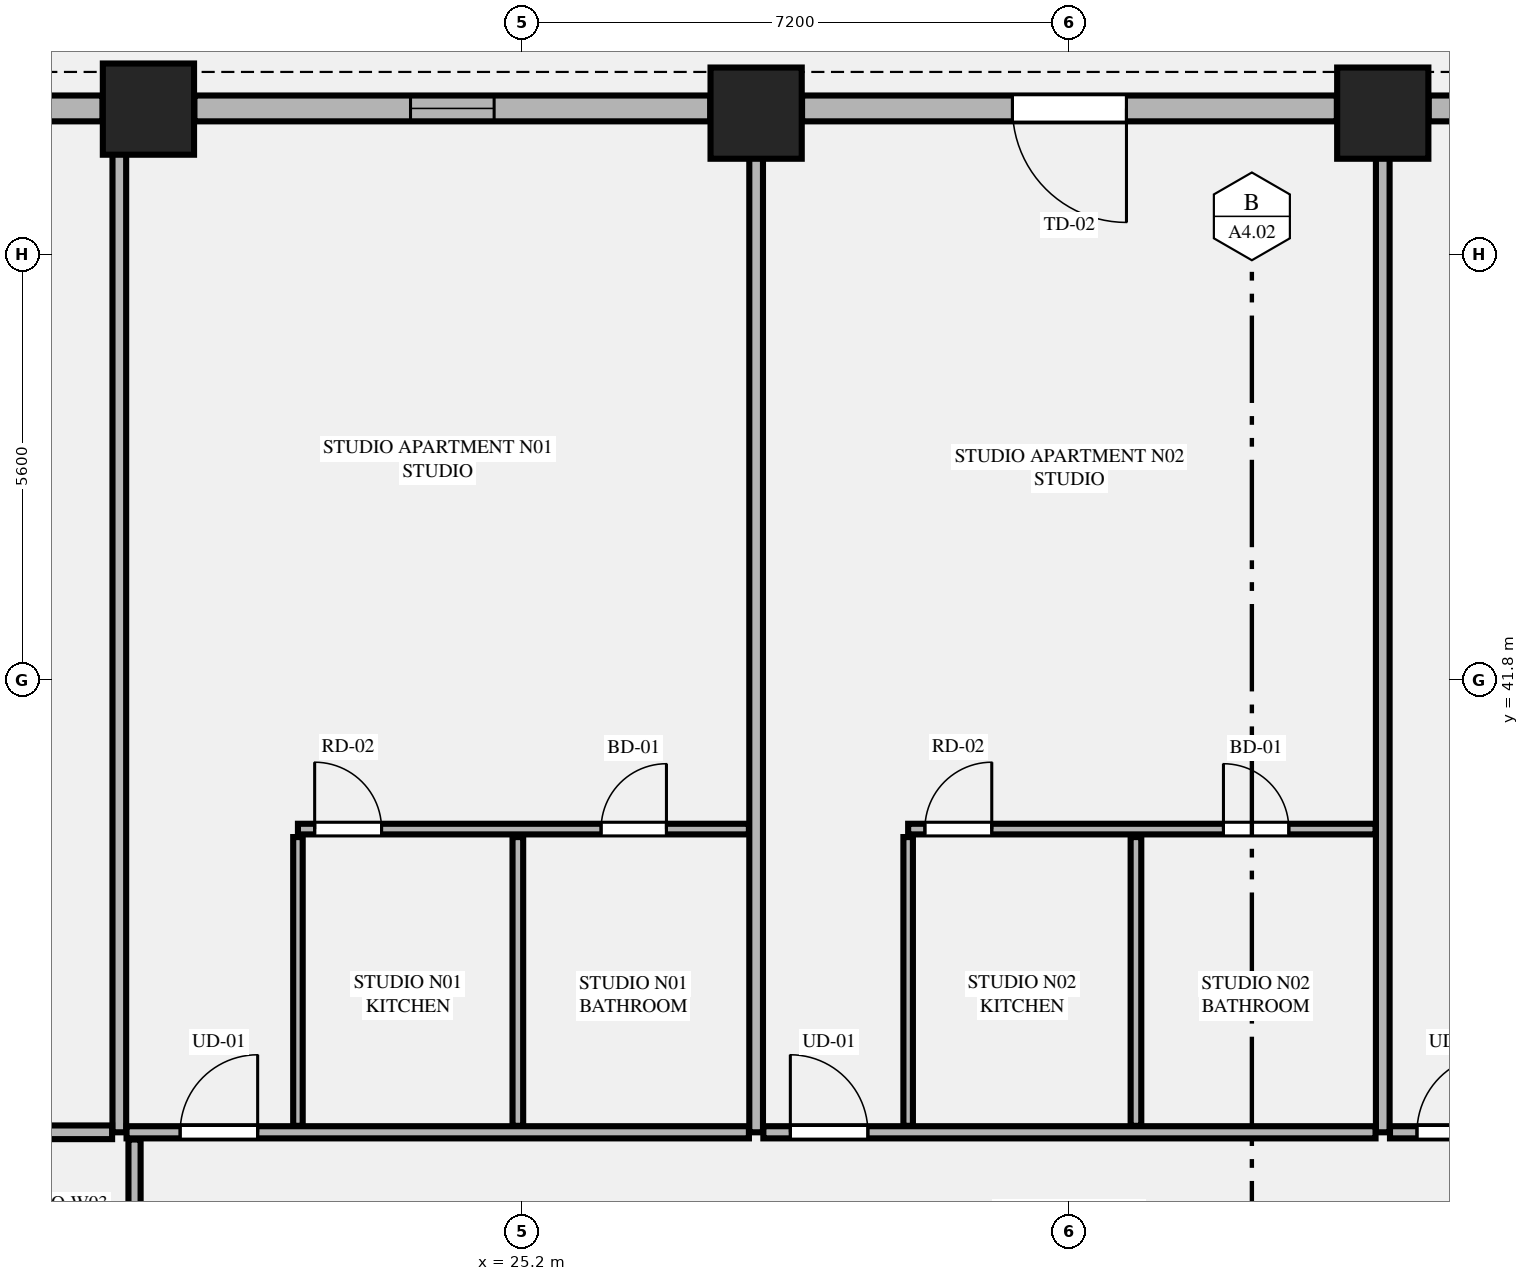
"""IFC4 building model, lengths in metres.
Left out: names, types, materials, properties, quantities, classifications, styles, units other than length and angle.
Written with IfcOpenShell. Run it as: python <this file> out.ifc"""

import sys

from ifc_helpers import new_model, si_unit, direction, frame, frame_2d, origin, origin_2d, place, context, subcontext, project, spatial, rectangle, extrude, element, fill, save


model = new_model("IFC4")
c1 = context("Model", 3, precision=1e-05, world=origin(), true_north=direction((0.0, 1.0)))
c2 = subcontext(c1, "Body", "Model", "MODEL_VIEW")
j1 = project(units=[si_unit("LENGTHUNIT", "METRE"), si_unit("PLANEANGLEUNIT", "RADIAN")], contexts=[c1])
p1 = place(None, origin())
s1 = spatial("IfcSite", under=j1, at=p1, CompositionType="ELEMENT")
p2 = place(p1, origin())
s2 = spatial("IfcBuilding", under=s1, at=p2, CompositionType="ELEMENT")
p3 = place(p2, frame((0.0, 0.0, 24.9)))
s3 = spatial("IfcBuildingStorey", under=s2, at=p3, CompositionType="ELEMENT", Elevation=24.9)
for number, where, z_axis, x_axis in (
    (1, (36.522, 49.258, 0.0), (0.0, 0.0, 1.0), (1.0, 0.0, 0.0)),
    (2, (28.278, 49.258, 0.0), (0.0, 0.0, 1.0), (1.0, 0.0, 0.0)),
    (3, (20.283, 49.311, 0.0), (0.0, 0.0, 1.0), (1.0, 0.0, 0.0)),
):
    element("IfcColumn", number, at=place(p3, frame(where, z_axis=z_axis, x_axis=x_axis)), inside=s3, PredefinedType="COLUMN", context=c2, shape_type="SweptSolid", body=[
        extrude(rectangle(XDim=1.2, YDim=1.2, at=origin_2d()), origin(), (0.0, 0.0, 1.0), 3.55),
    ])
p4 = place(p3, frame((43.913, 49.32, 0.0), z_axis=(0.0, 0.0, 1.0), x_axis=(-1.0, 0.0, 0.0)))
e4 = element("IfcWall", 4, at=p4, inside=s3, PredefinedType="STANDARD", context=c2, shape_type="SweptSolid", body=[
    extrude(rectangle(XDim=6.787, YDim=0.34, at=frame_2d((3.394, 0.0))), origin(), (0.0, 0.0, 1.0), 2.787),
])
p5 = place(p4, frame((2.843, 0.0, 0.75)))
e5 = element("IfcOpeningElement", 5, at=p5, cuts=e4, PredefinedType="OPENING", context=c2, shape_type="SweptSolid", body=[
    extrude(rectangle(XDim=1.1, YDim=1.887, at=frame_2d((0.55, 0.943))), frame((0.0, 0.18, 0.0), z_axis=(0.0, -1.0, 0.0), x_axis=(1.0, 0.0, 0.0)), (0.0, 0.0, 1.0), 0.36),
])
p6 = place(p3, frame((35.918, 49.32, 0.0), z_axis=(0.0, 0.0, 1.0), x_axis=(-1.0, 0.0, 0.0)))
e6 = element("IfcWall", 6, at=p6, inside=s3, PredefinedType="STANDARD", context=c2, shape_type="SweptSolid", body=[
    extrude(rectangle(XDim=7.036, YDim=0.34, at=frame_2d((3.518, 0.0))), origin(), (0.0, 0.0, 1.0), 2.787),
])
p7 = place(p6, frame((2.768, 0.0, 0.0)))
e7 = element("IfcOpeningElement", 7, at=p7, cuts=e6, PredefinedType="OPENING", context=c2, shape_type="SweptSolid", body=[
    extrude(rectangle(XDim=1.5, YDim=2.3, at=frame_2d((0.75, 1.15))), frame((0.0, 0.18, 0.0), z_axis=(0.0, -1.0, 0.0), x_axis=(1.0, 0.0, 0.0)), (0.0, 0.0, 1.0), 0.36),
])
p8 = place(p3, frame((27.674, 49.32, 0.0), z_axis=(0.0, 0.0, 1.0), x_axis=(-1.0, 0.0, 0.0)))
e8 = element("IfcWall", 8, at=p8, inside=s3, PredefinedType="STANDARD", context=c2, shape_type="SweptSolid", body=[
    extrude(rectangle(XDim=6.787, YDim=0.34, at=frame_2d((3.394, 0.0))), origin(), (0.0, 0.0, 1.0), 2.787),
])
p9 = place(p8, frame((2.843, 0.0, 0.75)))
e9 = element("IfcOpeningElement", 9, at=p9, cuts=e8, PredefinedType="OPENING", context=c2, shape_type="SweptSolid", body=[
    extrude(rectangle(XDim=1.1, YDim=1.887, at=frame_2d((0.55, 0.943))), frame((0.0, 0.18, 0.0), z_axis=(0.0, -1.0, 0.0), x_axis=(1.0, 0.0, 0.0)), (0.0, 0.0, 1.0), 0.36),
])
p10 = place(p3, frame((19.679, 49.32, 0.0), z_axis=(0.0, 0.0, 1.0), x_axis=(-1.0, 0.0, 0.0)))
e10 = element("IfcWall", 10, at=p10, inside=s3, PredefinedType="STANDARD", context=c2, shape_type="SweptSolid", body=[
    extrude(rectangle(XDim=1.245, YDim=0.34, at=frame_2d((0.623, 0.0))), origin(), (0.0, 0.0, 1.0), 3.33),
])
p11 = place(p3, frame((19.9, 35.85, 0.0), z_axis=(0.0, 0.0, 1.0), x_axis=(0.0, 1.0, 0.0)))
e11 = element("IfcWall", 11, at=p11, inside=s3, PredefinedType="PARTITIONING", context=c2, shape_type="SweptSolid", body=[
    extrude(rectangle(XDim=13.295, YDim=0.18, at=frame_2d((6.647, 0.0))), origin(), (0.0, 0.0, 1.0), 3.33),
])
for number, where, z_axis, x_axis in (
    (12, (28.278, 35.85, 0.0), (0.0, 0.0, 1.0), (0.0, 1.0, 0.0)),
    (13, (36.522, 35.85, 0.0), (0.0, 0.0, 1.0), (0.0, 1.0, 0.0)),
):
    element("IfcWall", number, at=place(p3, frame(where, z_axis=z_axis, x_axis=x_axis)), inside=s3, PredefinedType="PARTITIONING", context=c2, shape_type="SweptSolid", body=[
        extrude(rectangle(XDim=13.295, YDim=0.18, at=frame_2d((6.647, 0.0))), origin(), (0.0, 0.0, 1.0), 2.637),
    ])
p12 = place(p3, frame((19.995, 35.85, 0.0), z_axis=(0.0, 0.0, 1.0), x_axis=(1.0, 0.0, 0.0)))
e14 = element("IfcWall", 14, at=p12, inside=s3, PredefinedType="PARTITIONING", context=c2, shape_type="SweptSolid", body=[
    extrude(rectangle(XDim=8.188, YDim=0.16, at=frame_2d((4.094, 0.0))), origin(), (0.0, 0.0, 1.0), 3.33),
])
p13 = place(p12, frame((0.705, 0.0, 0.0)))
e15 = element("IfcOpeningElement", 15, at=p13, cuts=e14, PredefinedType="OPENING", context=c2, shape_type="SweptSolid", body=[
    extrude(rectangle(XDim=1.02, YDim=2.25, at=frame_2d((0.51, 1.125))), frame((0.0, 0.09, 0.0), z_axis=(0.0, -1.0, 0.0), x_axis=(1.0, 0.0, 0.0)), (0.0, 0.0, 1.0), 0.18),
])
p14 = place(p3, frame((22.25, 35.935, 0.0), z_axis=(0.0, 0.0, 1.0), x_axis=(0.0, 1.0, 0.0)))
e16 = element("IfcWall", 16, at=p14, inside=s3, PredefinedType="PARTITIONING", context=c2, shape_type="SweptSolid", body=[
    extrude(rectangle(XDim=3.799, YDim=0.125, at=frame_2d((1.899, 0.0))), origin(), (0.0, 0.0, 1.0), 2.637),
])
p15 = place(p3, frame((22.25, 39.839, 0.0), z_axis=(0.0, 0.0, 1.0), x_axis=(1.0, 0.0, 0.0)))
e17 = element("IfcWall", 17, at=p15, inside=s3, PredefinedType="PLUMBINGWALL", context=c2, shape_type="SweptSolid", body=[
    extrude(rectangle(XDim=5.933, YDim=0.14, at=frame_2d((2.967, 0.0))), origin(), (0.0, 0.0, 1.0), 3.33),
])
p16 = place(p15, frame((3.988, 0.0, 0.0)))
e18 = element("IfcOpeningElement", 18, at=p16, cuts=e17, PredefinedType="OPENING", context=c2, shape_type="SweptSolid", body=[
    extrude(rectangle(XDim=0.86, YDim=2.1, at=frame_2d((0.43, 1.05))), frame((0.0, 0.08, 0.0), z_axis=(0.0, -1.0, 0.0), x_axis=(1.0, 0.0, 0.0)), (0.0, 0.0, 1.0), 0.16),
])
p17 = place(p15, frame((0.22, 0.0, 0.0)))
e19 = element("IfcOpeningElement", 19, at=p17, cuts=e17, PredefinedType="OPENING", context=c2, shape_type="SweptSolid", body=[
    extrude(rectangle(XDim=0.88, YDim=2.15, at=frame_2d((0.44, 1.075))), frame((0.0, 0.08, 0.0), z_axis=(0.0, -1.0, 0.0), x_axis=(1.0, 0.0, 0.0)), (0.0, 0.0, 1.0), 0.16),
])
p18 = place(p3, frame((25.143, 35.935, 0.0), z_axis=(0.0, 0.0, 1.0), x_axis=(0.0, 1.0, 0.0)))
e20 = element("IfcWall", 20, at=p18, inside=s3, PredefinedType="PLUMBINGWALL", context=c2, shape_type="SweptSolid", body=[
    extrude(rectangle(XDim=3.799, YDim=0.14, at=frame_2d((1.899, 0.0))), origin(), (0.0, 0.0, 1.0), 3.33),
])
p19 = place(p3, frame((28.373, 35.85, 0.0), z_axis=(0.0, 0.0, 1.0), x_axis=(1.0, 0.0, 0.0)))
e21 = element("IfcWall", 21, at=p19, inside=s3, PredefinedType="PARTITIONING", context=c2, shape_type="SweptSolid", body=[
    extrude(rectangle(XDim=8.054, YDim=0.16, at=frame_2d((4.027, 0.0))), origin(), (0.0, 0.0, 1.0), 3.33),
])
p20 = place(p19, frame((0.355, 0.0, 0.0)))
e22 = element("IfcOpeningElement", 22, at=p20, cuts=e21, PredefinedType="OPENING", context=c2, shape_type="SweptSolid", body=[
    extrude(rectangle(XDim=1.02, YDim=2.25, at=frame_2d((0.51, 1.125))), frame((0.0, 0.09, 0.0), z_axis=(0.0, -1.0, 0.0), x_axis=(1.0, 0.0, 0.0)), (0.0, 0.0, 1.0), 0.18),
])
p21 = place(p3, frame((30.278, 35.935, 0.0), z_axis=(0.0, 0.0, 1.0), x_axis=(0.0, 1.0, 0.0)))
e23 = element("IfcWall", 23, at=p21, inside=s3, PredefinedType="PARTITIONING", context=c2, shape_type="SweptSolid", body=[
    extrude(rectangle(XDim=3.799, YDim=0.125, at=frame_2d((1.899, 0.0))), origin(), (0.0, 0.0, 1.0), 3.33),
])
p22 = place(p3, frame((30.278, 39.839, 0.0), z_axis=(0.0, 0.0, 1.0), x_axis=(1.0, 0.0, 0.0)))
e24 = element("IfcWall", 24, at=p22, inside=s3, PredefinedType="PLUMBINGWALL", context=c2, shape_type="SweptSolid", body=[
    extrude(rectangle(XDim=6.149, YDim=0.14, at=frame_2d((3.074, 0.0))), origin(), (0.0, 0.0, 1.0), 3.33),
])
p23 = place(p22, frame((4.148, 0.0, 0.0)))
e25 = element("IfcOpeningElement", 25, at=p23, cuts=e24, PredefinedType="OPENING", context=c2, shape_type="SweptSolid", body=[
    extrude(rectangle(XDim=0.86, YDim=2.1, at=frame_2d((0.43, 1.05))), frame((0.0, 0.08, 0.0), z_axis=(0.0, -1.0, 0.0), x_axis=(1.0, 0.0, 0.0)), (0.0, 0.0, 1.0), 0.16),
])
p24 = place(p22, frame((0.22, 0.0, 0.0)))
e26 = element("IfcOpeningElement", 26, at=p24, cuts=e24, PredefinedType="OPENING", context=c2, shape_type="SweptSolid", body=[
    extrude(rectangle(XDim=0.88, YDim=2.15, at=frame_2d((0.44, 1.075))), frame((0.0, 0.08, 0.0), z_axis=(0.0, -1.0, 0.0), x_axis=(1.0, 0.0, 0.0)), (0.0, 0.0, 1.0), 0.16),
])
p25 = place(p3, frame((33.275, 35.935, 0.0), z_axis=(0.0, 0.0, 1.0), x_axis=(0.0, 1.0, 0.0)))
e27 = element("IfcWall", 27, at=p25, inside=s3, PredefinedType="PLUMBINGWALL", context=c2, shape_type="SweptSolid", body=[
    extrude(rectangle(XDim=3.799, YDim=0.14, at=frame_2d((1.899, 0.0))), origin(), (0.0, 0.0, 1.0), 3.33),
])
p26 = place(p3, frame((36.617, 35.85, 0.0), z_axis=(0.0, 0.0, 1.0), x_axis=(1.0, 0.0, 0.0)))
e28 = element("IfcWall", 28, at=p26, inside=s3, PredefinedType="PARTITIONING", context=c2, shape_type="SweptSolid", body=[
    extrude(rectangle(XDim=8.188, YDim=0.16, at=frame_2d((4.094, 0.0))), origin(), (0.0, 0.0, 1.0), 3.33),
])
p27 = place(p26, frame((0.355, 0.0, 0.0)))
e29 = element("IfcOpeningElement", 29, at=p27, cuts=e28, PredefinedType="OPENING", context=c2, shape_type="SweptSolid", body=[
    extrude(rectangle(XDim=1.02, YDim=2.25, at=frame_2d((0.51, 1.125))), frame((0.0, 0.09, 0.0), z_axis=(0.0, -1.0, 0.0), x_axis=(1.0, 0.0, 0.0)), (0.0, 0.0, 1.0), 0.18),
])
p28 = place(p3, frame((10.665, 35.85, 0.0), z_axis=(0.0, 0.0, 1.0), x_axis=(1.0, 0.0, 0.0)))
e30 = element("IfcWall", 30, at=p28, inside=s3, PredefinedType="PARTITIONING", context=c2, shape_type="SweptSolid", body=[
    extrude(rectangle(XDim=9.14, YDim=0.18, at=frame_2d((4.57, 0.0))), origin(), (0.0, 0.0, 1.0), 3.33),
])
p29 = place(p3, frame((20.1, 29.179, 0.0), z_axis=(0.0, 0.0, 1.0), x_axis=(0.0, 1.0, 0.0)))
e31 = element("IfcWall", 31, at=p29, inside=s3, PredefinedType="PARTITIONING", context=c2, shape_type="SweptSolid", body=[
    extrude(rectangle(XDim=6.576, YDim=0.16, at=frame_2d((3.288, 0.0))), origin(), (0.0, 0.0, 1.0), 3.33),
])
p30 = place(p29, frame((0.4, 0.0, 0.0)))
e32 = element("IfcOpeningElement", 32, at=p30, cuts=e31, PredefinedType="OPENING", context=c2, shape_type="SweptSolid", body=[
    extrude(rectangle(XDim=1.02, YDim=2.25, at=frame_2d((0.51, 1.125))), frame((0.0, 0.09, 0.0), z_axis=(0.0, -1.0, 0.0), x_axis=(1.0, 0.0, 0.0)), (0.0, 0.0, 1.0), 0.18),
])
p31 = place(p7, origin())
e33 = element("IfcDoor", 33, at=p31, inside=s3, OperationType="SINGLE_SWING_LEFT", PredefinedType="DOOR", context=c2, shape_type="SweptSolid", body=[
    extrude(rectangle(XDim=1.5, YDim=2.3, at=frame_2d((0.75, 1.15))), frame((0.0, 0.025, 0.0), z_axis=(0.0, -1.0, 0.0), x_axis=(1.0, 0.0, 0.0)), (0.0, 0.0, 1.0), 0.05),
])
fill(e7, e33)
p32 = place(p9, origin())
e34 = element("IfcWindow", 34, at=p32, inside=s3, PartitioningType="SINGLE_PANEL", PredefinedType="WINDOW", context=c2, shape_type="SweptSolid", body=[
    extrude(rectangle(XDim=1.1, YDim=1.887, at=frame_2d((0.55, 0.943))), frame((0.0, 0.03, 0.0), z_axis=(0.0, -1.0, 0.0), x_axis=(1.0, 0.0, 0.0)), (0.0, 0.0, 1.0), 0.06),
])
fill(e9, e34)
p33 = place(p16, origin())
e35 = element("IfcDoor", 35, at=p33, inside=s3, OperationType="SINGLE_SWING_RIGHT", PredefinedType="DOOR", context=c2, shape_type="SweptSolid", body=[
    extrude(rectangle(XDim=0.86, YDim=2.1, at=frame_2d((0.43, 1.05))), frame((0.0, 0.025, 0.0), z_axis=(0.0, -1.0, 0.0), x_axis=(1.0, 0.0, 0.0)), (0.0, 0.0, 1.0), 0.05),
])
fill(e18, e35)
p34 = place(p13, origin())
e36 = element("IfcDoor", 36, at=p34, inside=s3, OperationType="SINGLE_SWING_RIGHT", PredefinedType="DOOR", context=c2, shape_type="SweptSolid", body=[
    extrude(rectangle(XDim=1.02, YDim=2.25, at=frame_2d((0.51, 1.125))), frame((0.0, 0.025, 0.0), z_axis=(0.0, -1.0, 0.0), x_axis=(1.0, 0.0, 0.0)), (0.0, 0.0, 1.0), 0.05),
])
fill(e15, e36)
p35 = place(p17, origin())
e37 = element("IfcDoor", 37, at=p35, inside=s3, OperationType="SINGLE_SWING_LEFT", PredefinedType="DOOR", context=c2, shape_type="SweptSolid", body=[
    extrude(rectangle(XDim=0.88, YDim=2.15, at=frame_2d((0.44, 1.075))), frame((0.0, 0.025, 0.0), z_axis=(0.0, -1.0, 0.0), x_axis=(1.0, 0.0, 0.0)), (0.0, 0.0, 1.0), 0.05),
])
fill(e19, e37)
p36 = place(p23, origin())
e38 = element("IfcDoor", 38, at=p36, inside=s3, OperationType="SINGLE_SWING_LEFT", PredefinedType="DOOR", context=c2, shape_type="SweptSolid", body=[
    extrude(rectangle(XDim=0.86, YDim=2.1, at=frame_2d((0.43, 1.05))), frame((0.0, 0.025, 0.0), z_axis=(0.0, -1.0, 0.0), x_axis=(1.0, 0.0, 0.0)), (0.0, 0.0, 1.0), 0.05),
])
fill(e25, e38)
p37 = place(p20, origin())
e39 = element("IfcDoor", 39, at=p37, inside=s3, OperationType="SINGLE_SWING_LEFT", PredefinedType="DOOR", context=c2, shape_type="SweptSolid", body=[
    extrude(rectangle(XDim=1.02, YDim=2.25, at=frame_2d((0.51, 1.125))), frame((0.0, 0.025, 0.0), z_axis=(0.0, -1.0, 0.0), x_axis=(1.0, 0.0, 0.0)), (0.0, 0.0, 1.0), 0.05),
])
fill(e22, e39)
p38 = place(p24, origin())
e40 = element("IfcDoor", 40, at=p38, inside=s3, OperationType="SINGLE_SWING_RIGHT", PredefinedType="DOOR", context=c2, shape_type="SweptSolid", body=[
    extrude(rectangle(XDim=0.88, YDim=2.15, at=frame_2d((0.44, 1.075))), frame((0.0, 0.025, 0.0), z_axis=(0.0, -1.0, 0.0), x_axis=(1.0, 0.0, 0.0)), (0.0, 0.0, 1.0), 0.05),
])
fill(e26, e40)
p39 = place(p27, origin())
e41 = element("IfcDoor", 41, at=p39, inside=s3, OperationType="SINGLE_SWING_RIGHT", PredefinedType="DOOR", context=c2, shape_type="SweptSolid", body=[
    extrude(rectangle(XDim=1.02, YDim=2.25, at=frame_2d((0.51, 1.125))), frame((0.0, 0.025, 0.0), z_axis=(0.0, -1.0, 0.0), x_axis=(1.0, 0.0, 0.0)), (0.0, 0.0, 1.0), 0.05),
])
fill(e29, e41)
save(model, sys.argv[1])
